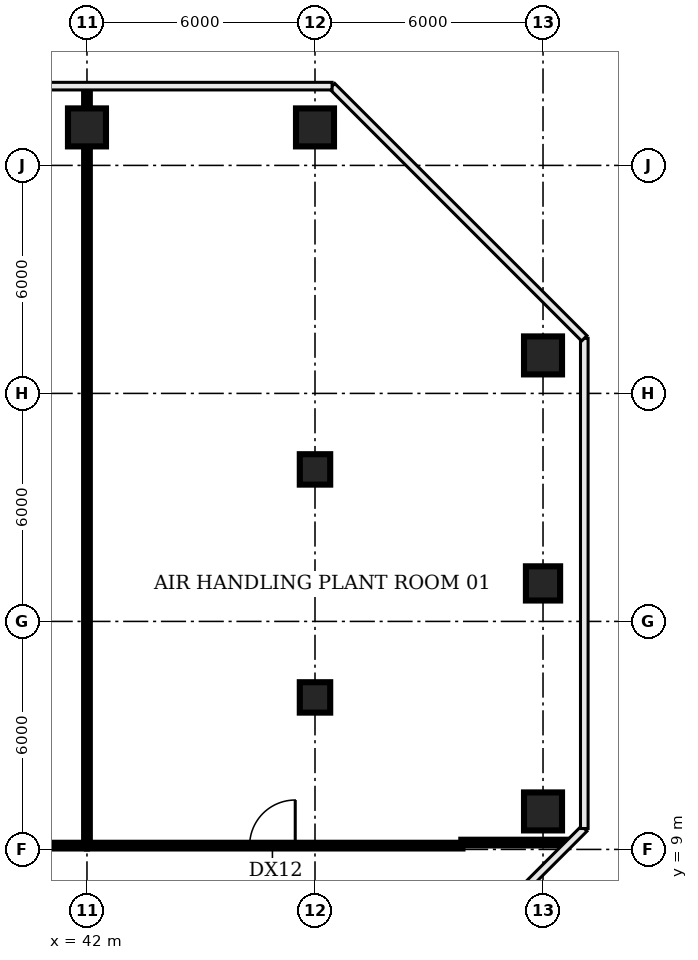
"""IFC4 building model, lengths in metres.
Left out: names, types, materials, properties, quantities, classifications, styles, units other than length and angle.
Written with IfcOpenShell. Run it as: python <this file> out.ifc"""

import sys

from ifc_helpers import new_model, si_unit, direction, frame, frame_2d, origin, origin_2d, place, context, subcontext, project, spatial, rectangle, circle, extrude, element, fill, save


model = new_model("IFC4")
c1 = context("Model", 3, precision=1e-05, world=origin(), true_north=direction((0.0, 1.0)))
c2 = subcontext(c1, "Body", "Model", "MODEL_VIEW")
j1 = project(units=[si_unit("LENGTHUNIT", "METRE"), si_unit("PLANEANGLEUNIT", "RADIAN")], contexts=[c1])
p1 = place(None, origin())
s1 = spatial("IfcSite", under=j1, at=p1, CompositionType="ELEMENT")
p2 = place(p1, origin())
s2 = spatial("IfcBuilding", under=s1, at=p2, CompositionType="ELEMENT")
p3 = place(p2, frame((0.0, 0.0, 134.0)))
s3 = spatial("IfcBuildingStorey", under=s2, at=p3, CompositionType="ELEMENT", Elevation=134.0)
p4 = place(p3, frame((42.0, 28.0, 0.0), z_axis=(0.0, 0.0, 1.0), x_axis=(1.0, 0.0, 0.0)))
e1 = element("IfcColumn", 1, at=p4, inside=s3, PredefinedType="COLUMN", context=c2, shape_type="SweptSolid", body=[
    extrude(rectangle(XDim=1.0, YDim=1.0, at=origin_2d()), origin(), (0.0, 0.0, 1.0), 3.2),
])
for number, where, z_axis, x_axis in (
    (2, (48.0, 13.0, 0.0), (0.0, 0.0, 1.0), (1.0, 0.0, 0.0)),
    (3, (48.0, 19.0, 0.0), (0.0, 0.0, 1.0), (1.0, 0.0, 0.0)),
):
    element("IfcColumn", number, at=place(p3, frame(where, z_axis=z_axis, x_axis=x_axis)), inside=s3, PredefinedType="COLUMN", context=c2, shape_type="SweptSolid", body=[
        extrude(rectangle(XDim=0.8, YDim=0.8, at=origin_2d()), origin(), (0.0, 0.0, 1.0), 3.8),
    ])
for number, where, z_axis, x_axis in (
    (4, (48.0, 28.0, 0.0), (0.0, 0.0, 1.0), (1.0, 0.0, 0.0)),
    (5, (54.0, 10.0, 0.0), (0.0, 0.0, 1.0), (1.0, 0.0, 0.0)),
):
    element("IfcColumn", number, at=place(p3, frame(where, z_axis=z_axis, x_axis=x_axis)), inside=s3, PredefinedType="COLUMN", context=c2, shape_type="SweptSolid", body=[
        extrude(circle(Radius=0.5, at=origin_2d()), origin(), (0.0, 0.0, 1.0), 3.8),
    ])
p5 = place(p3, frame((54.0, 16.0, 0.0), z_axis=(0.0, 0.0, 1.0), x_axis=(1.0, 0.0, 0.0)))
e6 = element("IfcColumn", 6, at=p5, inside=s3, PredefinedType="COLUMN", context=c2, shape_type="SweptSolid", body=[
    extrude(rectangle(XDim=0.9, YDim=0.9, at=origin_2d()), origin(), (0.0, 0.0, 1.0), 3.8),
])
p6 = place(p3, frame((54.0, 22.0, 0.0), z_axis=(0.0, 0.0, 1.0), x_axis=(1.0, 0.0, 0.0)))
e7 = element("IfcColumn", 7, at=p6, inside=s3, PredefinedType="COLUMN", context=c2, shape_type="SweptSolid", body=[
    extrude(circle(Radius=0.5, at=origin_2d()), origin(), (0.0, 0.0, 1.0), 3.8),
])
p7 = place(p3, frame((27.45, 9.1, 0.0), z_axis=(0.0, 0.0, 1.0), x_axis=(1.0, 0.0, 0.0)))
e8 = element("IfcWall", 8, at=p7, inside=s3, PredefinedType="PARTITIONING", context=c2, shape_type="SweptSolid", body=[
    extrude(rectangle(XDim=14.55, YDim=0.15, at=frame_2d((7.275, 0.0))), origin(), (0.0, 0.0, 1.0), 2.78),
])
p8 = place(p3, frame((42.0, 9.1, 0.0), z_axis=(0.0, 0.0, 1.0), x_axis=(0.0, 1.0, 0.0)))
e9 = element("IfcWall", 9, at=p8, inside=s3, PredefinedType="PARTITIONING", context=c2, shape_type="SweptSolid", body=[
    extrude(rectangle(XDim=19.94, YDim=0.15, at=frame_2d((9.97, 0.0))), origin(), (0.0, 0.0, 1.0), 2.78),
])
p9 = place(p3, frame((42.0, 9.1, 0.0), z_axis=(0.0, 0.0, 1.0), x_axis=(1.0, 0.0, 0.0)))
e10 = element("IfcWall", 10, at=p9, inside=s3, PredefinedType="PARTITIONING", context=c2, shape_type="SweptSolid", body=[
    extrude(rectangle(XDim=9.88, YDim=0.15, at=frame_2d((4.94, 0.0))), origin(), (0.0, 0.0, 1.0), 2.78),
])
p10 = place(p9, frame((4.28, 0.0, 0.0)))
e11 = element("IfcOpeningElement", 11, at=p10, cuts=e10, PredefinedType="OPENING", context=c2, shape_type="SweptSolid", body=[
    extrude(rectangle(XDim=1.2, YDim=2.1, at=frame_2d((0.6, 1.05))), frame((0.0, 0.085, 0.0), z_axis=(0.0, -1.0, 0.0), x_axis=(1.0, 0.0, 0.0)), (0.0, 0.0, 1.0), 0.17),
])
p11 = place(p3, frame((51.85, 9.18, 0.0), z_axis=(0.0, 0.0, 1.0), x_axis=(1.0, 0.0, 0.0)))
e12 = element("IfcWall", 12, at=p11, inside=s3, PredefinedType="PARTITIONING", context=c2, shape_type="SweptSolid", body=[
    extrude(rectangle(XDim=2.781, YDim=0.15, at=frame_2d((1.391, 0.0))), origin(), (0.0, 0.0, 1.0), 2.78),
])
p12 = place(p10, origin())
e13 = element("IfcDoor", 13, at=p12, inside=s3, OperationType="SINGLE_SWING_RIGHT", PredefinedType="DOOR", context=c2, shape_type="SweptSolid", body=[
    extrude(rectangle(XDim=1.2, YDim=2.1, at=frame_2d((0.6, 1.05))), frame((0.0, 0.025, 0.0), z_axis=(0.0, -1.0, 0.0), x_axis=(1.0, 0.0, 0.0)), (0.0, 0.0, 1.0), 0.05),
])
fill(e11, e13)
save(model, sys.argv[1])
